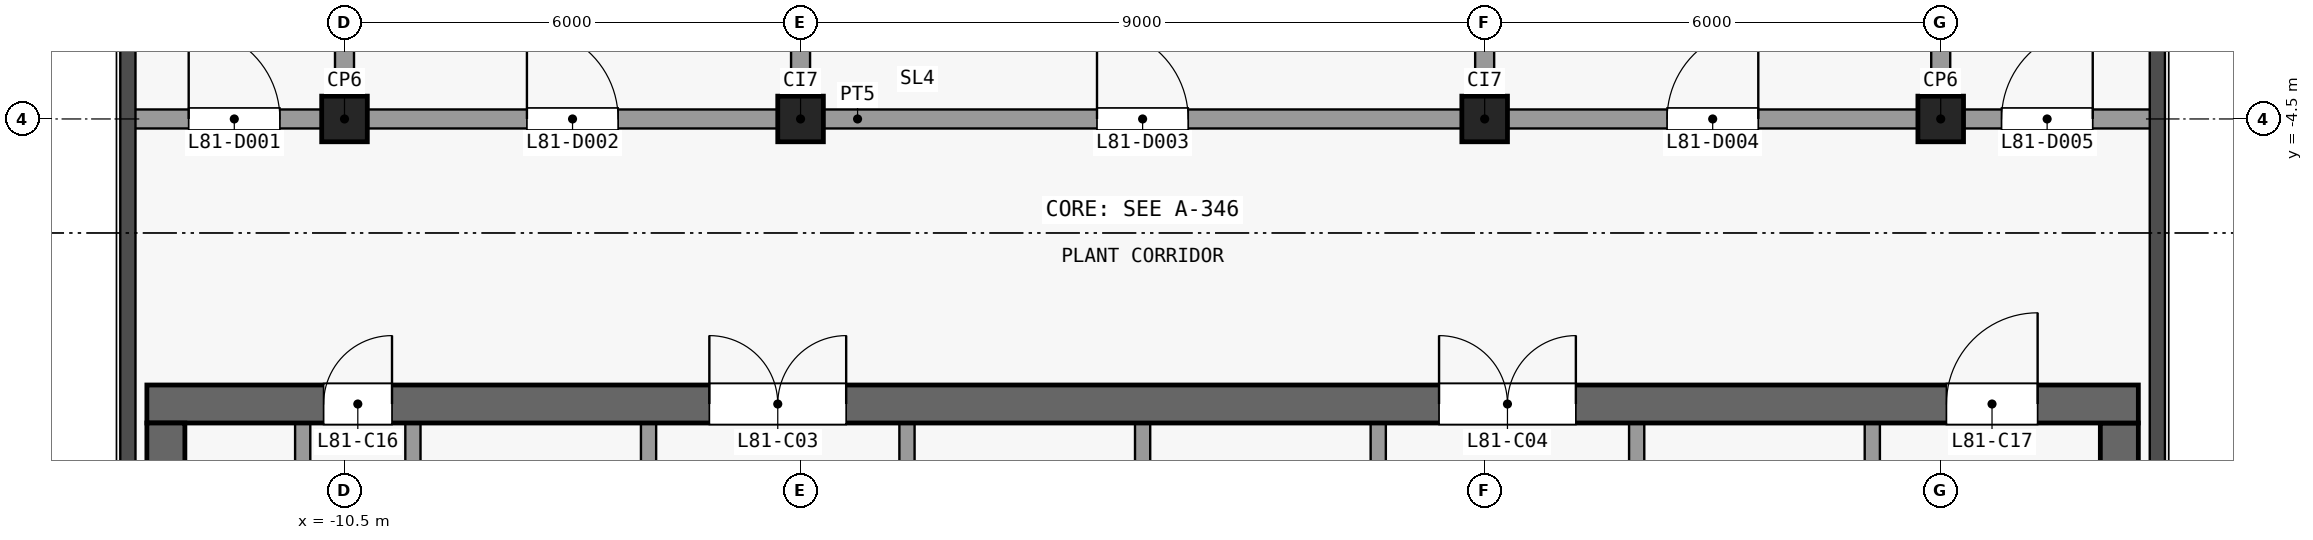
"""IFC4 building model, lengths in metres.
Left out: names, types, materials, properties, quantities, classifications, styles, units other than length and angle.
Written with IfcOpenShell. Run it as: python <this file> out.ifc"""

import sys

from ifc_helpers import new_model, si_unit, direction, frame, frame_2d, origin, origin_2d, place, context, subcontext, project, spatial, rectangle, extrude, element, fill, save


model = new_model("IFC4")
c1 = context("Model", 3, precision=1e-05, world=origin(), true_north=direction((0.0, 1.0)))
c2 = subcontext(c1, "Body", "Model", "MODEL_VIEW")
j1 = project(units=[si_unit("LENGTHUNIT", "METRE"), si_unit("PLANEANGLEUNIT", "RADIAN")], contexts=[c1])
p1 = place(None, origin())
s1 = spatial("IfcSite", under=j1, at=p1, CompositionType="ELEMENT")
p2 = place(p1, origin())
s2 = spatial("IfcBuilding", under=s1, at=p2, CompositionType="ELEMENT")
p3 = place(p2, frame((0.0, 0.0, 321.2)))
s3 = spatial("IfcBuildingStorey", under=s2, at=p3, CompositionType="ELEMENT", Elevation=321.2)
for number, where, z_axis, x_axis in (
    (1, (-10.5, -4.5, 0.0), (0.0, 0.0, 1.0), (1.0, 0.0, 0.0)),
    (2, (-4.5, -4.5, 0.0), (0.0, 0.0, 1.0), (1.0, 0.0, 0.0)),
    (3, (4.5, -4.5, 0.0), (0.0, 0.0, 1.0), (1.0, 0.0, 0.0)),
    (4, (10.5, -4.5, 0.0), (0.0, 0.0, 1.0), (1.0, 0.0, 0.0)),
):
    element("IfcColumn", number, at=place(p3, frame(where, z_axis=z_axis, x_axis=x_axis)), inside=s3, PredefinedType="COLUMN", context=c2, shape_type="SweptSolid", body=[
        extrude(rectangle(XDim=0.6, YDim=0.6, at=origin_2d()), origin(), (0.0, 0.0, 1.0), 4.5),
    ])
p4 = place(p3, frame((-13.1, -8.25, 0.0), z_axis=(0.0, 0.0, 1.0), x_axis=(1.0, 0.0, 0.0)))
e5 = element("IfcWall", 5, at=p4, inside=s3, PredefinedType="SHEAR", context=c2, shape_type="SweptSolid", body=[
    extrude(rectangle(XDim=26.2, YDim=0.5, at=frame_2d((13.1, 0.0))), origin(), (0.0, 0.0, 1.0), 4.05),
])
p5 = place(p4, frame((7.4, 0.0, 0.0)))
e6 = element("IfcOpeningElement", 6, at=p5, cuts=e5, PredefinedType="OPENING", context=c2, shape_type="SweptSolid", body=[
    extrude(rectangle(XDim=1.8, YDim=2.1, at=frame_2d((0.9, 1.05))), frame((0.0, 0.26, 0.0), z_axis=(0.0, -1.0, 0.0), x_axis=(1.0, 0.0, 0.0)), (0.0, 0.0, 1.0), 0.52),
])
p6 = place(p4, frame((17.0, 0.0, 0.0)))
e7 = element("IfcOpeningElement", 7, at=p6, cuts=e5, PredefinedType="OPENING", context=c2, shape_type="SweptSolid", body=[
    extrude(rectangle(XDim=1.8, YDim=2.1, at=frame_2d((0.9, 1.05))), frame((0.0, 0.26, 0.0), z_axis=(0.0, -1.0, 0.0), x_axis=(1.0, 0.0, 0.0)), (0.0, 0.0, 1.0), 0.52),
])
p7 = place(p4, frame((2.325, 0.0, 0.0)))
e8 = element("IfcOpeningElement", 8, at=p7, cuts=e5, PredefinedType="OPENING", context=c2, shape_type="SweptSolid", body=[
    extrude(rectangle(XDim=0.9, YDim=2.1, at=frame_2d((0.45, 1.05))), frame((0.0, 0.26, 0.0), z_axis=(0.0, -1.0, 0.0), x_axis=(1.0, 0.0, 0.0)), (0.0, 0.0, 1.0), 0.52),
])
p8 = place(p4, frame((23.675, 0.0, 0.0)))
e9 = element("IfcOpeningElement", 9, at=p8, cuts=e5, PredefinedType="OPENING", context=c2, shape_type="SweptSolid", body=[
    extrude(rectangle(XDim=1.2, YDim=2.1, at=frame_2d((0.6, 1.05))), frame((0.0, 0.26, 0.0), z_axis=(0.0, -1.0, 0.0), x_axis=(1.0, 0.0, 0.0)), (0.0, 0.0, 1.0), 0.52),
])
for number, where, z_axis, x_axis in (
    (10, (-12.85, -24.6, 0.0), (0.0, 0.0, 1.0), (0.0, 1.0, 0.0)),
    (11, (12.85, -24.6, 0.0), (0.0, 0.0, 1.0), (0.0, 1.0, 0.0)),
):
    element("IfcWall", number, at=place(p3, frame(where, z_axis=z_axis, x_axis=x_axis)), inside=s3, PredefinedType="SHEAR", context=c2, shape_type="SweptSolid", body=[
        extrude(rectangle(XDim=16.1, YDim=0.5, at=frame_2d((8.05, 0.0))), origin(), (0.0, 0.0, 1.0), 4.05),
    ])
p9 = place(p3, frame((-11.05, -12.1, 0.0), z_axis=(0.0, 0.0, 1.0), x_axis=(0.0, 1.0, 0.0)))
e12 = element("IfcWall", 12, at=p9, inside=s3, PredefinedType="PARTITIONING", context=c2, shape_type="SweptSolid", body=[
    extrude(rectangle(XDim=3.6, YDim=0.2, at=frame_2d((1.8, 0.0))), origin(), (0.0, 0.0, 1.0), 4.05),
])
p10 = place(p9, frame((1.4, 0.0, 0.0)))
e13 = element("IfcOpeningElement", 13, at=p10, cuts=e12, PredefinedType="OPENING", context=c2, shape_type="SweptSolid", body=[
    extrude(rectangle(XDim=0.9, YDim=2.1, at=frame_2d((0.45, 1.05))), frame((0.0, 0.11, 0.0), z_axis=(0.0, -1.0, 0.0), x_axis=(1.0, 0.0, 0.0)), (0.0, 0.0, 1.0), 0.22),
])
p11 = place(p3, frame((-9.6, -16.9, 0.0), z_axis=(0.0, 0.0, 1.0), x_axis=(0.0, 1.0, 0.0)))
e14 = element("IfcWall", 14, at=p11, inside=s3, PredefinedType="PARTITIONING", context=c2, shape_type="SweptSolid", body=[
    extrude(rectangle(XDim=8.4, YDim=0.2, at=frame_2d((4.2, 0.0))), origin(), (0.0, 0.0, 1.0), 4.05),
])
p12 = place(p3, frame((-6.5, -22.5, 0.0), z_axis=(0.0, 0.0, 1.0), x_axis=(0.0, 1.0, 0.0)))
e15 = element("IfcWall", 15, at=p12, inside=s3, PredefinedType="PARTITIONING", context=c2, shape_type="SweptSolid", body=[
    extrude(rectangle(XDim=14.0, YDim=0.2, at=frame_2d((7.0, 0.0))), origin(), (0.0, 0.0, 1.0), 4.05),
])
p13 = place(p12, frame((1.04, 0.0, 0.0)))
e16 = element("IfcOpeningElement", 16, at=p13, cuts=e15, PredefinedType="OPENING", context=c2, shape_type="SweptSolid", body=[
    extrude(rectangle(XDim=0.9, YDim=2.1, at=frame_2d((0.45, 1.05))), frame((0.0, 0.11, 0.0), z_axis=(0.0, -1.0, 0.0), x_axis=(1.0, 0.0, 0.0)), (0.0, 0.0, 1.0), 0.22),
])
p14 = place(p12, frame((5.06, 0.0, 0.0)))
e17 = element("IfcOpeningElement", 17, at=p14, cuts=e15, PredefinedType="OPENING", context=c2, shape_type="SweptSolid", body=[
    extrude(rectangle(XDim=1.2, YDim=2.1, at=frame_2d((0.6, 1.05))), frame((0.0, 0.11, 0.0), z_axis=(0.0, -1.0, 0.0), x_axis=(1.0, 0.0, 0.0)), (0.0, 0.0, 1.0), 0.22),
])
p15 = place(p12, frame((10.62, 0.0, 0.0)))
e18 = element("IfcOpeningElement", 18, at=p15, cuts=e15, PredefinedType="OPENING", context=c2, shape_type="SweptSolid", body=[
    extrude(rectangle(XDim=1.2, YDim=2.1, at=frame_2d((0.6, 1.05))), frame((0.0, 0.11, 0.0), z_axis=(0.0, -1.0, 0.0), x_axis=(1.0, 0.0, 0.0)), (0.0, 0.0, 1.0), 0.22),
])
p16 = place(p3, frame((-3.1, -8.5, 0.0), z_axis=(0.0, 0.0, 1.0), x_axis=(0.0, -1.0, 0.0)))
e19 = element("IfcWall", 19, at=p16, inside=s3, PredefinedType="PARTITIONING", context=c2, shape_type="SweptSolid", body=[
    extrude(rectangle(XDim=10.97, YDim=0.2, at=frame_2d((5.485, 0.0))), origin(), (0.0, 0.0, 1.0), 4.05),
])
p17 = place(p16, frame((6.35, 0.0, 0.0)))
e20 = element("IfcOpeningElement", 20, at=p17, cuts=e19, PredefinedType="OPENING", context=c2, shape_type="SweptSolid", body=[
    extrude(rectangle(XDim=1.2, YDim=2.1, at=frame_2d((0.6, 1.05))), frame((0.0, 0.11, 0.0), z_axis=(0.0, -1.0, 0.0), x_axis=(1.0, 0.0, 0.0)), (0.0, 0.0, 1.0), 0.22),
])
p18 = place(p16, frame((0.94, 0.0, 0.0)))
e21 = element("IfcOpeningElement", 21, at=p18, cuts=e19, PredefinedType="OPENING", context=c2, shape_type="SweptSolid", body=[
    extrude(rectangle(XDim=0.9, YDim=2.1, at=frame_2d((0.45, 1.05))), frame((0.0, 0.11, 0.0), z_axis=(0.0, -1.0, 0.0), x_axis=(1.0, 0.0, 0.0)), (0.0, 0.0, 1.0), 0.22),
])
p19 = place(p3, frame((0.0, -19.35, 0.0), z_axis=(0.0, 0.0, 1.0), x_axis=(0.0, 1.0, 0.0)))
e22 = element("IfcWall", 22, at=p19, inside=s3, PredefinedType="PARTITIONING", context=c2, shape_type="SweptSolid", body=[
    extrude(rectangle(XDim=10.85, YDim=0.2, at=frame_2d((5.425, 0.0))), origin(), (0.0, 0.0, 1.0), 4.05),
])
p20 = place(p3, frame((3.1, -19.6, 0.0), z_axis=(0.0, 0.0, 1.0), x_axis=(0.0, 1.0, 0.0)))
e23 = element("IfcWall", 23, at=p20, inside=s3, PredefinedType="PARTITIONING", context=c2, shape_type="SweptSolid", body=[
    extrude(rectangle(XDim=11.1, YDim=0.2, at=frame_2d((5.55, 0.0))), origin(), (0.0, 0.0, 1.0), 4.05),
])
p21 = place(p20, frame((1.025, 0.0, 0.0)))
e24 = element("IfcOpeningElement", 24, at=p21, cuts=e23, PredefinedType="OPENING", context=c2, shape_type="SweptSolid", body=[
    extrude(rectangle(XDim=0.9, YDim=2.1, at=frame_2d((0.45, 1.05))), frame((0.0, 0.11, 0.0), z_axis=(0.0, -1.0, 0.0), x_axis=(1.0, 0.0, 0.0)), (0.0, 0.0, 1.0), 0.22),
])
p22 = place(p20, frame((6.375, 0.0, 0.0)))
e25 = element("IfcOpeningElement", 25, at=p22, cuts=e23, PredefinedType="OPENING", context=c2, shape_type="SweptSolid", body=[
    extrude(rectangle(XDim=1.2, YDim=2.1, at=frame_2d((0.6, 1.05))), frame((0.0, 0.11, 0.0), z_axis=(0.0, -1.0, 0.0), x_axis=(1.0, 0.0, 0.0)), (0.0, 0.0, 1.0), 0.22),
])
p23 = place(p3, frame((6.5, -8.5, 0.0), z_axis=(0.0, 0.0, 1.0), x_axis=(0.0, -1.0, 0.0)))
e26 = element("IfcWall", 26, at=p23, inside=s3, PredefinedType="PARTITIONING", context=c2, shape_type="SweptSolid", body=[
    extrude(rectangle(XDim=10.85, YDim=0.2, at=frame_2d((5.425, 0.0))), origin(), (0.0, 0.0, 1.0), 4.05),
])
p24 = place(p23, frame((7.65, 0.0, 0.0)))
e27 = element("IfcOpeningElement", 27, at=p24, cuts=e26, PredefinedType="OPENING", context=c2, shape_type="SweptSolid", body=[
    extrude(rectangle(XDim=1.2, YDim=2.1, at=frame_2d((0.6, 1.05))), frame((0.0, 0.11, 0.0), z_axis=(0.0, -1.0, 0.0), x_axis=(1.0, 0.0, 0.0)), (0.0, 0.0, 1.0), 0.22),
])
p25 = place(p23, frame((2.15, 0.0, 0.0)))
e28 = element("IfcOpeningElement", 28, at=p25, cuts=e26, PredefinedType="OPENING", context=c2, shape_type="SweptSolid", body=[
    extrude(rectangle(XDim=1.2, YDim=2.1, at=frame_2d((0.6, 1.05))), frame((0.0, 0.11, 0.0), z_axis=(0.0, -1.0, 0.0), x_axis=(1.0, 0.0, 0.0)), (0.0, 0.0, 1.0), 0.22),
])
p26 = place(p3, frame((9.6, -16.9, 0.0), z_axis=(0.0, 0.0, 1.0), x_axis=(0.0, 1.0, 0.0)))
e29 = element("IfcWall", 29, at=p26, inside=s3, PredefinedType="PARTITIONING", context=c2, shape_type="SweptSolid", body=[
    extrude(rectangle(XDim=8.4, YDim=0.2, at=frame_2d((4.2, 0.0))), origin(), (0.0, 0.0, 1.0), 4.05),
])
p27 = place(p3, frame((-13.35, -4.5, 0.0), z_axis=(0.0, 0.0, 1.0), x_axis=(1.0, 0.0, 0.0)))
e30 = element("IfcWall", 30, at=p27, inside=s3, PredefinedType="PARTITIONING", context=c2, shape_type="SweptSolid", body=[
    extrude(rectangle(XDim=26.7, YDim=0.25, at=frame_2d((13.35, 0.0))), origin(), (0.0, 0.0, 1.0), 4.05),
])
p28 = place(p27, frame((0.8, 0.0, 0.0)))
e31 = element("IfcOpeningElement", 31, at=p28, cuts=e30, PredefinedType="OPENING", context=c2, shape_type="SweptSolid", body=[
    extrude(rectangle(XDim=1.2, YDim=2.1, at=frame_2d((0.6, 1.05))), frame((0.0, 0.135, 0.0), z_axis=(0.0, -1.0, 0.0), x_axis=(1.0, 0.0, 0.0)), (0.0, 0.0, 1.0), 0.27),
])
p29 = place(p27, frame((5.25, 0.0, 0.0)))
e32 = element("IfcOpeningElement", 32, at=p29, cuts=e30, PredefinedType="OPENING", context=c2, shape_type="SweptSolid", body=[
    extrude(rectangle(XDim=1.2, YDim=2.1, at=frame_2d((0.6, 1.05))), frame((0.0, 0.135, 0.0), z_axis=(0.0, -1.0, 0.0), x_axis=(1.0, 0.0, 0.0)), (0.0, 0.0, 1.0), 0.27),
])
p30 = place(p27, frame((12.75, 0.0, 0.0)))
e33 = element("IfcOpeningElement", 33, at=p30, cuts=e30, PredefinedType="OPENING", context=c2, shape_type="SweptSolid", body=[
    extrude(rectangle(XDim=1.2, YDim=2.1, at=frame_2d((0.6, 1.05))), frame((0.0, 0.135, 0.0), z_axis=(0.0, -1.0, 0.0), x_axis=(1.0, 0.0, 0.0)), (0.0, 0.0, 1.0), 0.27),
])
p31 = place(p27, frame((20.25, 0.0, 0.0)))
e34 = element("IfcOpeningElement", 34, at=p31, cuts=e30, PredefinedType="OPENING", context=c2, shape_type="SweptSolid", body=[
    extrude(rectangle(XDim=1.2, YDim=2.1, at=frame_2d((0.6, 1.05))), frame((0.0, 0.135, 0.0), z_axis=(0.0, -1.0, 0.0), x_axis=(1.0, 0.0, 0.0)), (0.0, 0.0, 1.0), 0.27),
])
p32 = place(p27, frame((24.65, 0.0, 0.0)))
e35 = element("IfcOpeningElement", 35, at=p32, cuts=e30, PredefinedType="OPENING", context=c2, shape_type="SweptSolid", body=[
    extrude(rectangle(XDim=1.2, YDim=2.1, at=frame_2d((0.6, 1.05))), frame((0.0, 0.135, 0.0), z_axis=(0.0, -1.0, 0.0), x_axis=(1.0, 0.0, 0.0)), (0.0, 0.0, 1.0), 0.27),
])
p33 = place(p3, frame((-10.5, -4.375, 0.0), z_axis=(0.0, 0.0, 1.0), x_axis=(0.0, 1.0, 0.0)))
e36 = element("IfcWall", 36, at=p33, inside=s3, PredefinedType="PARTITIONING", context=c2, shape_type="SweptSolid", body=[
    extrude(rectangle(XDim=9.125, YDim=0.25, at=frame_2d((4.562, 0.0))), origin(), (0.0, 0.0, 1.0), 4.05),
])
for number, where, z_axis, x_axis in (
    (37, (-4.5, -4.375, 0.0), (0.0, 0.0, 1.0), (0.0, 1.0, 0.0)),
    (38, (4.5, -4.375, 0.0), (0.0, 0.0, 1.0), (0.0, 1.0, 0.0)),
):
    element("IfcWall", number, at=place(p3, frame(where, z_axis=z_axis, x_axis=x_axis)), inside=s3, PredefinedType="PARTITIONING", context=c2, shape_type="SweptSolid", body=[
        extrude(rectangle(XDim=14.625, YDim=0.25, at=frame_2d((7.312, 0.0))), origin(), (0.0, 0.0, 1.0), 4.05),
    ])
p34 = place(p3, frame((10.5, -4.375, 0.0), z_axis=(0.0, 0.0, 1.0), x_axis=(0.0, 1.0, 0.0)))
e39 = element("IfcWall", 39, at=p34, inside=s3, PredefinedType="PARTITIONING", context=c2, shape_type="SweptSolid", body=[
    extrude(rectangle(XDim=9.125, YDim=0.25, at=frame_2d((4.562, 0.0))), origin(), (0.0, 0.0, 1.0), 4.05),
])
p35 = place(p5, origin())
e40 = element("IfcDoor", 40, at=p35, inside=s3, OperationType="DOUBLE_DOOR_SINGLE_SWING", PredefinedType="DOOR", context=c2, shape_type="SweptSolid", body=[
    extrude(rectangle(XDim=1.8, YDim=2.1, at=frame_2d((0.9, 1.05))), frame((0.0, 0.025, 0.0), z_axis=(0.0, -1.0, 0.0), x_axis=(1.0, 0.0, 0.0)), (0.0, 0.0, 1.0), 0.05),
])
fill(e6, e40)
p36 = place(p6, origin())
e41 = element("IfcDoor", 41, at=p36, inside=s3, OperationType="DOUBLE_DOOR_SINGLE_SWING", PredefinedType="DOOR", context=c2, shape_type="SweptSolid", body=[
    extrude(rectangle(XDim=1.8, YDim=2.1, at=frame_2d((0.9, 1.05))), frame((0.0, 0.025, 0.0), z_axis=(0.0, -1.0, 0.0), x_axis=(1.0, 0.0, 0.0)), (0.0, 0.0, 1.0), 0.05),
])
fill(e7, e41)
p37 = place(p7, origin())
e42 = element("IfcDoor", 42, at=p37, inside=s3, OperationType="SINGLE_SWING_RIGHT", PredefinedType="DOOR", context=c2, shape_type="SweptSolid", body=[
    extrude(rectangle(XDim=0.9, YDim=2.1, at=frame_2d((0.45, 1.05))), frame((0.0, 0.025, 0.0), z_axis=(0.0, -1.0, 0.0), x_axis=(1.0, 0.0, 0.0)), (0.0, 0.0, 1.0), 0.05),
])
fill(e8, e42)
p38 = place(p8, origin())
e43 = element("IfcDoor", 43, at=p38, inside=s3, OperationType="SINGLE_SWING_RIGHT", PredefinedType="DOOR", context=c2, shape_type="SweptSolid", body=[
    extrude(rectangle(XDim=1.2, YDim=2.1, at=frame_2d((0.6, 1.05))), frame((0.0, 0.025, 0.0), z_axis=(0.0, -1.0, 0.0), x_axis=(1.0, 0.0, 0.0)), (0.0, 0.0, 1.0), 0.05),
])
fill(e9, e43)
p39 = place(p28, origin())
e44 = element("IfcDoor", 44, at=p39, inside=s3, OperationType="SINGLE_SWING_RIGHT", PredefinedType="DOOR", context=c2, shape_type="SweptSolid", body=[
    extrude(rectangle(XDim=1.2, YDim=2.1, at=frame_2d((0.6, 1.05))), frame((0.0, 0.025, 0.0), z_axis=(0.0, -1.0, 0.0), x_axis=(1.0, 0.0, 0.0)), (0.0, 0.0, 1.0), 0.05),
])
fill(e31, e44)
p40 = place(p29, origin())
e45 = element("IfcDoor", 45, at=p40, inside=s3, OperationType="SINGLE_SWING_RIGHT", PredefinedType="DOOR", context=c2, shape_type="SweptSolid", body=[
    extrude(rectangle(XDim=1.2, YDim=2.1, at=frame_2d((0.6, 1.05))), frame((0.0, 0.025, 0.0), z_axis=(0.0, -1.0, 0.0), x_axis=(1.0, 0.0, 0.0)), (0.0, 0.0, 1.0), 0.05),
])
fill(e32, e45)
p41 = place(p30, origin())
e46 = element("IfcDoor", 46, at=p41, inside=s3, OperationType="SINGLE_SWING_RIGHT", PredefinedType="DOOR", context=c2, shape_type="SweptSolid", body=[
    extrude(rectangle(XDim=1.2, YDim=2.1, at=frame_2d((0.6, 1.05))), frame((0.0, 0.025, 0.0), z_axis=(0.0, -1.0, 0.0), x_axis=(1.0, 0.0, 0.0)), (0.0, 0.0, 1.0), 0.05),
])
fill(e33, e46)
p42 = place(p31, origin())
e47 = element("IfcDoor", 47, at=p42, inside=s3, OperationType="SINGLE_SWING_LEFT", PredefinedType="DOOR", context=c2, shape_type="SweptSolid", body=[
    extrude(rectangle(XDim=1.2, YDim=2.1, at=frame_2d((0.6, 1.05))), frame((0.0, 0.025, 0.0), z_axis=(0.0, -1.0, 0.0), x_axis=(1.0, 0.0, 0.0)), (0.0, 0.0, 1.0), 0.05),
])
fill(e34, e47)
p43 = place(p32, origin())
e48 = element("IfcDoor", 48, at=p43, inside=s3, OperationType="SINGLE_SWING_LEFT", PredefinedType="DOOR", context=c2, shape_type="SweptSolid", body=[
    extrude(rectangle(XDim=1.2, YDim=2.1, at=frame_2d((0.6, 1.05))), frame((0.0, 0.025, 0.0), z_axis=(0.0, -1.0, 0.0), x_axis=(1.0, 0.0, 0.0)), (0.0, 0.0, 1.0), 0.05),
])
fill(e35, e48)
save(model, sys.argv[1])
